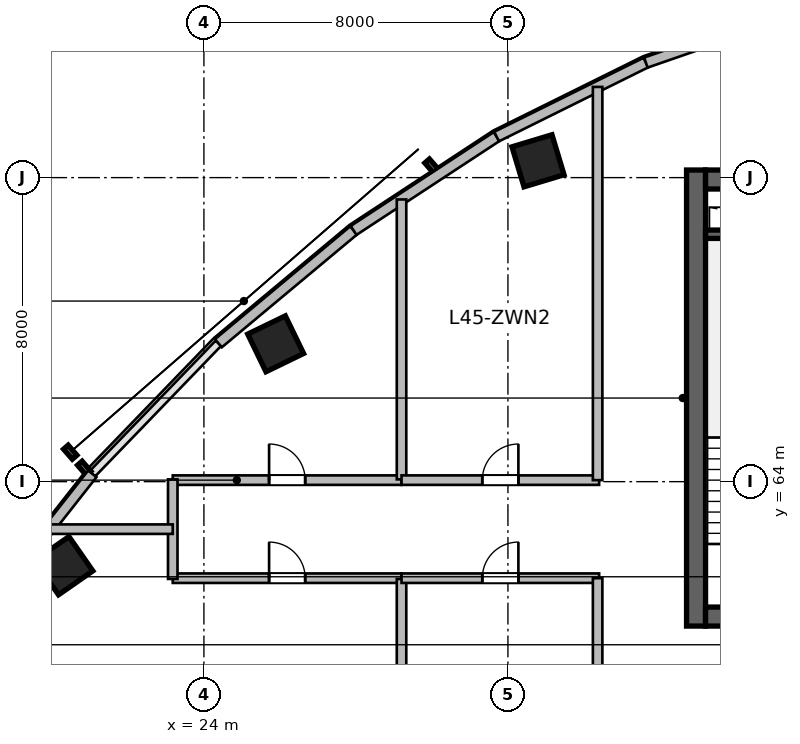
"""IFC4 building model, lengths in metres.
Left out: names, types, materials, properties, quantities, classifications, styles, units other than length and angle.
Written with IfcOpenShell. Run it as: python <this file> out.ifc"""

import sys

from ifc_helpers import new_model, si_unit, direction, frame, frame_2d, origin, origin_2d, place, context, subcontext, project, spatial, rectangle, extrude, source, transform, mapped, element, fill, save


model = new_model("IFC4")
c1 = context("Model", 3, precision=1e-05, world=origin(), true_north=direction((0.0, 1.0)))
c2 = subcontext(c1, "Body", "Model", "MODEL_VIEW")
j1 = project(units=[si_unit("LENGTHUNIT", "METRE"), si_unit("PLANEANGLEUNIT", "RADIAN")], contexts=[c1])
p1 = place(None, origin())
s1 = spatial("IfcSite", under=j1, at=p1, CompositionType="ELEMENT")
p2 = place(p1, origin())
s2 = spatial("IfcBuilding", under=s1, at=p2, CompositionType="ELEMENT")
p3 = place(p2, frame((0.0, 0.0, 185.7)))
s3 = spatial("IfcBuildingStorey", under=s2, at=p3, CompositionType="ELEMENT", Elevation=185.7)
m1 = source(origin(), c2, "Body", "SweptSolid", [
    extrude(rectangle(XDim=12.0, YDim=0.5, at=frame_2d((6.0, 0.0))), origin(), (0.0, 0.0, 1.0), 3.9),
])
p4 = place(p3, frame((36.95, 60.2, 0.0), z_axis=(0.0, 0.0, 1.0), x_axis=(0.0, 1.0, 0.0)))
e1 = element("IfcWall", 1, at=p4, inside=s3, PredefinedType="SHEAR", context=c2, shape_type="MappedRepresentation", body=[
    mapped(m1, transform((0.0, 0.0, 0.0), scale=1.0)),
])
m2 = source(origin(), c2, "Body", "SweptSolid", [
    extrude(rectangle(XDim=21.6, YDim=0.5, at=frame_2d((10.8, 0.0))), origin(), (0.0, 0.0, 1.0), 3.9),
])
p5 = place(p3, frame((37.2, 60.45, 0.0), z_axis=(0.0, 0.0, 1.0), x_axis=(1.0, 0.0, 0.0)))
e2 = element("IfcWall", 2, at=p5, inside=s3, PredefinedType="SHEAR", context=c2, shape_type="MappedRepresentation", body=[
    mapped(m2, transform((0.0, 0.0, 0.0), scale=1.0)),
])
p6 = place(p5, frame((1.1, 0.0, 0.0)))
e3 = element("IfcOpeningElement", 3, at=p6, cuts=e2, PredefinedType="OPENING", context=c2, shape_type="SweptSolid", body=[
    extrude(rectangle(XDim=1.15, YDim=2.15, at=frame_2d((0.575, 1.075))), frame((0.0, 0.26, 0.0), z_axis=(0.0, -1.0, 0.0), x_axis=(1.0, 0.0, 0.0)), (0.0, 0.0, 1.0), 0.52),
])
p7 = place(p5, frame((19.5, 0.0, 0.0)))
e4 = element("IfcOpeningElement", 4, at=p7, cuts=e2, PredefinedType="OPENING", context=c2, shape_type="SweptSolid", body=[
    extrude(rectangle(XDim=0.9, YDim=2.1, at=frame_2d((0.45, 1.05))), frame((0.0, 0.26, 0.0), z_axis=(0.0, -1.0, 0.0), x_axis=(1.0, 0.0, 0.0)), (0.0, 0.0, 1.0), 0.52),
])
p8 = place(p5, frame((12.02, 0.0, 0.0)))
e5 = element("IfcOpeningElement", 5, at=p8, cuts=e2, PredefinedType="OPENING", context=c2, shape_type="SweptSolid", body=[
    extrude(rectangle(XDim=1.6, YDim=2.15, at=frame_2d((0.8, 1.075))), frame((0.0, 0.26, 0.0), z_axis=(0.0, -1.0, 0.0), x_axis=(1.0, 0.0, 0.0)), (0.0, 0.0, 1.0), 0.52),
])
p9 = place(p3, frame((37.2, 71.95, 0.0), z_axis=(0.0, 0.0, 1.0), x_axis=(1.0, 0.0, 0.0)))
e6 = element("IfcWall", 6, at=p9, inside=s3, PredefinedType="SHEAR", context=c2, shape_type="MappedRepresentation", body=[
    mapped(m2, transform((0.0, 0.0, 0.0), scale=1.0)),
])
p10 = place(p9, frame((1.2, 0.0, 0.0)))
e7 = element("IfcOpeningElement", 7, at=p10, cuts=e6, PredefinedType="OPENING", context=c2, shape_type="SweptSolid", body=[
    extrude(rectangle(XDim=0.9, YDim=2.1, at=frame_2d((0.45, 1.05))), frame((0.0, 0.26, 0.0), z_axis=(0.0, -1.0, 0.0), x_axis=(1.0, 0.0, 0.0)), (0.0, 0.0, 1.0), 0.52),
])
p11 = place(p9, frame((14.7, 0.0, 0.0)))
e8 = element("IfcOpeningElement", 8, at=p11, cuts=e6, PredefinedType="OPENING", context=c2, shape_type="SweptSolid", body=[
    extrude(rectangle(XDim=1.2, YDim=2.15, at=frame_2d((0.6, 1.075))), frame((0.0, 0.26, 0.0), z_axis=(0.0, -1.0, 0.0), x_axis=(1.0, 0.0, 0.0)), (0.0, 0.0, 1.0), 0.52),
])
p12 = place(p9, frame((4.15, 0.0, 0.0)))
e9 = element("IfcOpeningElement", 9, at=p12, cuts=e6, PredefinedType="OPENING", context=c2, shape_type="SweptSolid", body=[
    extrude(rectangle(XDim=1.3, YDim=2.15, at=frame_2d((0.65, 1.075))), frame((0.0, 0.26, 0.0), z_axis=(0.0, -1.0, 0.0), x_axis=(1.0, 0.0, 0.0)), (0.0, 0.0, 1.0), 0.52),
])
p13 = place(p9, frame((7.25, 0.0, 0.0)))
e10 = element("IfcOpeningElement", 10, at=p13, cuts=e6, PredefinedType="OPENING", context=c2, shape_type="SweptSolid", body=[
    extrude(rectangle(XDim=0.9, YDim=2.1, at=frame_2d((0.45, 1.05))), frame((0.0, 0.26, 0.0), z_axis=(0.0, -1.0, 0.0), x_axis=(1.0, 0.0, 0.0)), (0.0, 0.0, 1.0), 0.52),
])
m3 = source(origin(), c2, "Body", "SweptSolid", [
    extrude(rectangle(XDim=3.27, YDim=0.22, at=frame_2d((1.635, 0.0))), origin(), (0.0, 0.0, 1.0), 3.9),
])
p14 = place(p3, frame((37.2, 70.51, 0.0), z_axis=(0.0, 0.0, 1.0), x_axis=(1.0, 0.0, 0.0)))
e11 = element("IfcWall", 11, at=p14, inside=s3, PredefinedType="SHEAR", context=c2, shape_type="MappedRepresentation", body=[
    mapped(m3, transform((0.0, 0.0, 0.0), scale=1.0)),
])
m4 = source(origin(), c2, "Body", "SweptSolid", [
    extrude(rectangle(XDim=1.1, YDim=1.1, at=origin_2d()), origin(), (0.0, 0.0, 1.0), 3.9),
])
for number, where, z_axis, x_axis in (
    (12, (20.311, 61.789, 0.0), (0.0, 0.0, 1.0), (-0.571, 0.821, 0.0)),
    (13, (25.888, 67.627, 0.0), (0.0, 0.0, 1.0), (-0.436, 0.9, 0.0)),
    (14, (32.791, 72.442, 0.0), (0.0, 0.0, 1.0), (-0.289, 0.957, 0.0)),
):
    element("IfcColumn", number, at=place(p3, frame(where, z_axis=z_axis, x_axis=x_axis)), inside=s3, PredefinedType="COLUMN", context=c2, shape_type="MappedRepresentation", body=[
        mapped(m4, transform((0.0, 0.0, 0.0), scale=1.0)),
    ])
m5 = source(origin(), c2, "Body", "SweptSolid", [
    extrude(rectangle(XDim=4.922, YDim=0.28, at=frame_2d((2.461, 0.0))), origin(), (0.0, 0.0, 1.0), 3.58),
])
p15 = place(p3, frame((18.021, 60.338, 0.0), z_axis=(0.0, 0.0, 1.0), x_axis=(0.61817639101, 0.786039407153, 0.0)))
e15 = element("IfcWall", 15, at=p15, inside=s3, PredefinedType="SOLIDWALL", context=c2, shape_type="MappedRepresentation", body=[
    mapped(m5, transform((0.0, 0.0, 0.0), scale=1.0)),
])
m6 = source(origin(), c2, "Body", "SweptSolid", [
    extrude(rectangle(XDim=4.634, YDim=0.28, at=frame_2d((2.317, 0.0))), origin(), (0.0, 0.0, 1.0), 3.58),
])
p16 = place(p3, frame((24.381, 67.642, 0.0), z_axis=(0.0, 0.0, 1.0), x_axis=(0.767910229096, 0.640557475993, 0.0)))
e16 = element("IfcWall", 16, at=p16, inside=s3, PredefinedType="SOLIDWALL", context=c2, shape_type="MappedRepresentation", body=[
    mapped(m6, transform((0.0, 0.0, 0.0), scale=1.0)),
])
m7 = source(origin(), c2, "Body", "SweptSolid", [
    extrude(rectangle(XDim=4.501, YDim=0.28, at=frame_2d((2.25, 0.0))), origin(), (0.0, 0.0, 1.0), 3.58),
])
p17 = place(p3, frame((27.939, 70.61, 0.0), z_axis=(0.0, 0.0, 1.0), x_axis=(0.835984920737, 0.548752414391, 0.0)))
e17 = element("IfcWall", 17, at=p17, inside=s3, PredefinedType="SOLIDWALL", context=c2, shape_type="MappedRepresentation", body=[
    mapped(m7, transform((0.0, 0.0, 0.0), scale=1.0)),
])
m8 = source(origin(), c2, "Body", "SweptSolid", [
    extrude(rectangle(XDim=4.384, YDim=0.28, at=frame_2d((2.192, 0.0))), origin(), (0.0, 0.0, 1.0), 3.58),
])
p18 = place(p3, frame((31.702, 73.08, 0.0), z_axis=(0.0, 0.0, 1.0), x_axis=(0.895969968053, 0.444114643248, 0.0)))
e18 = element("IfcWall", 18, at=p18, inside=s3, PredefinedType="SOLIDWALL", context=c2, shape_type="MappedRepresentation", body=[
    mapped(m8, transform((0.0, 0.0, 0.0), scale=1.0)),
])
m9 = source(origin(), c2, "Body", "SweptSolid", [
    extrude(rectangle(XDim=4.29, YDim=0.28, at=frame_2d((2.145, 0.0))), origin(), (0.0, 0.0, 1.0), 3.58),
])
p19 = place(p3, frame((35.63, 75.027, 0.0), z_axis=(0.0, 0.0, 1.0), x_axis=(0.944883859218, 0.3274057003, 0.0)))
e19 = element("IfcWall", 19, at=p19, inside=s3, PredefinedType="SOLIDWALL", context=c2, shape_type="MappedRepresentation", body=[
    mapped(m9, transform((0.0, 0.0, 0.0), scale=1.0)),
])
m10 = source(origin(), c2, "Body", "SweptSolid", [
    extrude(rectangle(XDim=6.02, YDim=0.25, at=frame_2d((3.01, 0.0))), origin(), (0.0, 0.0, 1.0), 3.58),
])
p20 = place(p3, frame((23.18, 64.04, 0.0), z_axis=(0.0, 0.0, 1.0), x_axis=(1.0, 0.0, 0.0)))
e20 = element("IfcWall", 20, at=p20, inside=s3, PredefinedType="PARTITIONING", context=c2, shape_type="MappedRepresentation", body=[
    mapped(m10, transform((0.0, 0.0, 0.0), scale=1.0)),
])
p21 = place(p20, frame((2.535, 0.0, 0.0)))
e21 = element("IfcOpeningElement", 21, at=p21, cuts=e20, PredefinedType="OPENING", context=c2, shape_type="SweptSolid", body=[
    extrude(rectangle(XDim=0.95, YDim=2.1, at=frame_2d((0.475, 1.05))), frame((0.0, 0.135, 0.0), z_axis=(0.0, -1.0, 0.0), x_axis=(1.0, 0.0, 0.0)), (0.0, 0.0, 1.0), 0.27),
])
m11 = source(origin(), c2, "Body", "SweptSolid", [
    extrude(rectangle(XDim=7.365, YDim=0.25, at=frame_2d((3.683, 0.0))), origin(), (0.0, 0.0, 1.0), 3.58),
])
p22 = place(p3, frame((29.2, 64.06, 0.0), z_axis=(0.0, 0.0, 1.0), x_axis=(0.0, 1.0, 0.0)))
e22 = element("IfcWall", 22, at=p22, inside=s3, PredefinedType="PARTITIONING", context=c2, shape_type="MappedRepresentation", body=[
    mapped(m11, transform((0.0, 0.0, 0.0), scale=1.0)),
])
m12 = source(origin(), c2, "Body", "SweptSolid", [
    extrude(rectangle(XDim=5.2, YDim=0.25, at=frame_2d((2.6, 0.0))), origin(), (0.0, 0.0, 1.0), 3.58),
])
p23 = place(p3, frame((29.2, 64.04, 0.0), z_axis=(0.0, 0.0, 1.0), x_axis=(1.0, 0.0, 0.0)))
e23 = element("IfcWall", 23, at=p23, inside=s3, PredefinedType="PARTITIONING", context=c2, shape_type="MappedRepresentation", body=[
    mapped(m12, transform((0.0, 0.0, 0.0), scale=1.0)),
])
p24 = place(p23, frame((2.125, 0.0, 0.0)))
e24 = element("IfcOpeningElement", 24, at=p24, cuts=e23, PredefinedType="OPENING", context=c2, shape_type="SweptSolid", body=[
    extrude(rectangle(XDim=0.95, YDim=2.1, at=frame_2d((0.475, 1.05))), frame((0.0, 0.135, 0.0), z_axis=(0.0, -1.0, 0.0), x_axis=(1.0, 0.0, 0.0)), (0.0, 0.0, 1.0), 0.27),
])
p25 = place(p3, frame((23.18, 61.46, 0.0), z_axis=(0.0, 0.0, 1.0), x_axis=(1.0, 0.0, 0.0)))
e25 = element("IfcWall", 25, at=p25, inside=s3, PredefinedType="PARTITIONING", context=c2, shape_type="MappedRepresentation", body=[
    mapped(m10, transform((0.0, 0.0, 0.0), scale=1.0)),
])
p26 = place(p25, frame((2.535, 0.0, 0.0)))
e26 = element("IfcOpeningElement", 26, at=p26, cuts=e25, PredefinedType="OPENING", context=c2, shape_type="SweptSolid", body=[
    extrude(rectangle(XDim=0.95, YDim=2.1, at=frame_2d((0.475, 1.05))), frame((0.0, 0.135, 0.0), z_axis=(0.0, -1.0, 0.0), x_axis=(1.0, 0.0, 0.0)), (0.0, 0.0, 1.0), 0.27),
])
m13 = source(origin(), c2, "Body", "SweptSolid", [
    extrude(rectangle(XDim=18.301, YDim=0.25, at=frame_2d((9.15, 0.0))), origin(), (0.0, 0.0, 1.0), 2.872),
])
p27 = place(p3, frame((29.2, 43.139, 0.0), z_axis=(0.0, 0.0, 1.0), x_axis=(0.0, 1.0, 0.0)))
e27 = element("IfcWall", 27, at=p27, inside=s3, PredefinedType="PARTITIONING", context=c2, shape_type="MappedRepresentation", body=[
    mapped(m13, transform((0.0, 0.0, 0.0), scale=1.0)),
])
p28 = place(p3, frame((29.2, 61.46, 0.0), z_axis=(0.0, 0.0, 1.0), x_axis=(1.0, 0.0, 0.0)))
e28 = element("IfcWall", 28, at=p28, inside=s3, PredefinedType="PARTITIONING", context=c2, shape_type="MappedRepresentation", body=[
    mapped(m12, transform((0.0, 0.0, 0.0), scale=1.0)),
])
p29 = place(p28, frame((2.125, 0.0, 0.0)))
e29 = element("IfcOpeningElement", 29, at=p29, cuts=e28, PredefinedType="OPENING", context=c2, shape_type="SweptSolid", body=[
    extrude(rectangle(XDim=0.95, YDim=2.1, at=frame_2d((0.475, 1.05))), frame((0.0, 0.135, 0.0), z_axis=(0.0, -1.0, 0.0), x_axis=(1.0, 0.0, 0.0)), (0.0, 0.0, 1.0), 0.27),
])
m14 = source(origin(), c2, "Body", "SweptSolid", [
    extrude(rectangle(XDim=12.126, YDim=0.25, at=frame_2d((6.063, 0.0))), origin(), (0.0, 0.0, 1.0), 3.58),
])
p30 = place(p3, frame((34.36, 49.334, 0.0), z_axis=(0.0, 0.0, 1.0), x_axis=(0.0, 1.0, 0.0)))
e30 = element("IfcWall", 30, at=p30, inside=s3, PredefinedType="PARTITIONING", context=c2, shape_type="MappedRepresentation", body=[
    mapped(m14, transform((0.0, 0.0, 0.0), scale=1.0)),
])
m15 = source(origin(), c2, "Body", "SweptSolid", [
    extrude(rectangle(XDim=10.346, YDim=0.25, at=frame_2d((5.173, 0.0))), origin(), (0.0, 0.0, 1.0), 3.58),
])
p31 = place(p3, frame((34.36, 64.04, 0.0), z_axis=(0.0, 0.0, 1.0), x_axis=(0.0, 1.0, 0.0)))
e31 = element("IfcWall", 31, at=p31, inside=s3, PredefinedType="PARTITIONING", context=c2, shape_type="MappedRepresentation", body=[
    mapped(m15, transform((0.0, 0.0, 0.0), scale=1.0)),
])
m16 = source(origin(), c2, "Body", "SweptSolid", [
    extrude(rectangle(XDim=2.62, YDim=0.25, at=frame_2d((1.31, 0.0))), origin(), (0.0, 0.0, 1.0), 3.58),
])
p32 = place(p3, frame((23.18, 61.44, 0.0), z_axis=(0.0, 0.0, 1.0), x_axis=(0.0, 1.0, 0.0)))
e32 = element("IfcWall", 32, at=p32, inside=s3, PredefinedType="PARTITIONING", context=c2, shape_type="MappedRepresentation", body=[
    mapped(m16, transform((0.0, 0.0, 0.0), scale=1.0)),
])
m17 = source(origin(), c2, "Body", "SweptSolid", [
    extrude(rectangle(XDim=3.249, YDim=0.25, at=frame_2d((1.625, 0.0))), origin(), (0.0, 0.0, 1.0), 3.58),
])
p33 = place(p3, frame((19.931, 62.75, 0.0), z_axis=(0.0, 0.0, 1.0), x_axis=(1.0, 0.0, 0.0)))
e33 = element("IfcWall", 33, at=p33, inside=s3, PredefinedType="PARTITIONING", context=c2, shape_type="MappedRepresentation", body=[
    mapped(m17, transform((0.0, 0.0, 0.0), scale=1.0)),
])
m18 = source(origin(), c2, "Body", "SweptSolid", [
    extrude(rectangle(XDim=0.95, YDim=2.1, at=frame_2d((0.475, 1.05))), frame((0.0, 0.025, 0.0), z_axis=(0.0, -1.0, 0.0), x_axis=(1.0, 0.0, 0.0)), (0.0, 0.0, 1.0), 0.05),
])
p34 = place(p21, origin())
e34 = element("IfcDoor", 34, at=p34, inside=s3, OperationType="SINGLE_SWING_LEFT", PredefinedType="DOOR", context=c2, shape_type="MappedRepresentation", body=[
    mapped(m18, transform((0.0, 0.0, 0.0), scale=1.0)),
])
fill(e21, e34)
p35 = place(p24, origin())
e35 = element("IfcDoor", 35, at=p35, inside=s3, OperationType="SINGLE_SWING_RIGHT", PredefinedType="DOOR", context=c2, shape_type="MappedRepresentation", body=[
    mapped(m18, transform((0.0, 0.0, 0.0), scale=1.0)),
])
fill(e24, e35)
p36 = place(p26, origin())
e36 = element("IfcDoor", 36, at=p36, inside=s3, OperationType="SINGLE_SWING_LEFT", PredefinedType="DOOR", context=c2, shape_type="MappedRepresentation", body=[
    mapped(m18, transform((0.0, 0.0, 0.0), scale=1.0)),
])
fill(e26, e36)
p37 = place(p29, origin())
e37 = element("IfcDoor", 37, at=p37, inside=s3, OperationType="SINGLE_SWING_RIGHT", PredefinedType="DOOR", context=c2, shape_type="MappedRepresentation", body=[
    mapped(m18, transform((0.0, 0.0, 0.0), scale=1.0)),
])
fill(e29, e37)
save(model, sys.argv[1])
